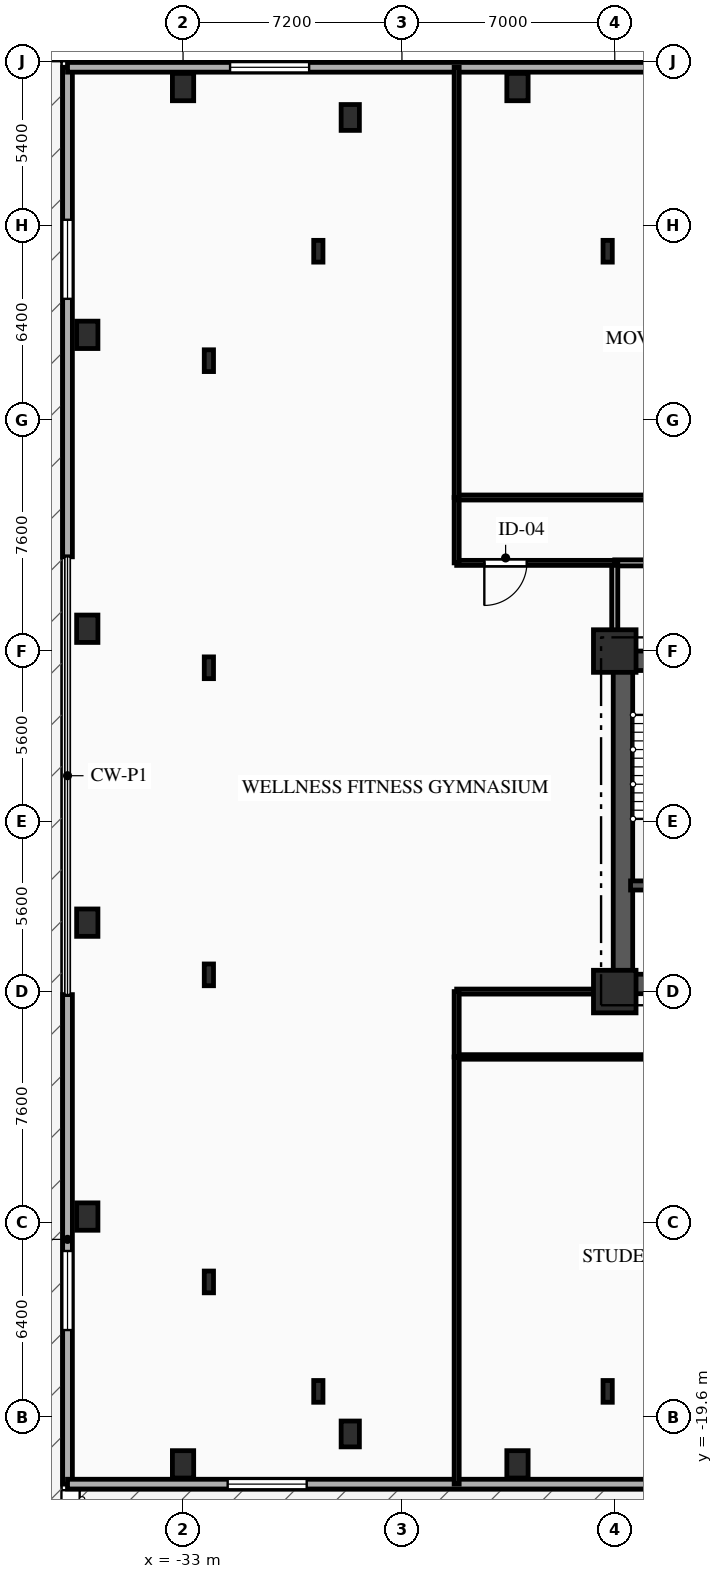
"""IFC4 building model, lengths in metres.
Left out: names, types, materials, properties, quantities, classifications, styles, units other than length and angle.
Written with IfcOpenShell. Run it as: python <this file> out.ifc"""

import sys

from ifc_helpers import new_model, si_unit, direction, frame, frame_2d, origin, origin_2d, place, context, subcontext, project, spatial, rectangle, i_section, extrude, element, fill, save


model = new_model("IFC4")
c1 = context("Model", 3, precision=1e-05, world=origin(), true_north=direction((0.0, 1.0)))
c2 = subcontext(c1, "Body", "Model", "MODEL_VIEW")
j1 = project(units=[si_unit("LENGTHUNIT", "METRE"), si_unit("PLANEANGLEUNIT", "RADIAN")], contexts=[c1])
p1 = place(None, origin())
s1 = spatial("IfcSite", under=j1, at=p1, CompositionType="ELEMENT")
p2 = place(p1, origin())
s2 = spatial("IfcBuilding", under=s1, at=p2, CompositionType="ELEMENT")
p3 = place(p2, frame((0.0, 0.0, 13.5)))
s3 = spatial("IfcBuildingStorey", under=s2, at=p3, CompositionType="ELEMENT", Elevation=13.5)
for number, where, z_axis, x_axis in (
    (1, (-18.8, -5.6, 0.0), (0.0, 0.0, 1.0), (1.0, 0.0, 0.0)),
    (2, (-18.8, 5.6, 0.0), (0.0, 0.0, 1.0), (1.0, 0.0, 0.0)),
):
    element("IfcColumn", number, at=place(p3, frame(where, z_axis=z_axis, x_axis=x_axis)), inside=s3, PredefinedType="COLUMN", context=c2, shape_type="SweptSolid", body=[
        extrude(rectangle(XDim=1.4, YDim=1.4, at=origin_2d()), origin(), (0.0, 0.0, 1.0), 4.5),
    ])
for number, where, z_axis, x_axis in (
    (3, (-33.0, -21.15, 0.0), (0.0, 0.0, 1.0), (1.0, 0.0, 0.0)),
    (4, (-22.0, -21.15, 0.0), (0.0, 0.0, 1.0), (1.0, 0.0, 0.0)),
    (5, (-33.0, 24.15, 0.0), (0.0, 0.0, 1.0), (1.0, 0.0, 0.0)),
    (6, (-22.0, 24.15, 0.0), (0.0, 0.0, 1.0), (1.0, 0.0, 0.0)),
    (7, (-36.15, -13.0, 0.0), (0.0, 0.0, 1.0), (1.0, 0.0, 0.0)),
    (8, (-36.15, -3.333, 0.0), (0.0, 0.0, 1.0), (1.0, 0.0, 0.0)),
    (9, (-36.15, 6.333, 0.0), (0.0, 0.0, 1.0), (1.0, 0.0, 0.0)),
    (10, (-36.15, 16.0, 0.0), (0.0, 0.0, 1.0), (1.0, 0.0, 0.0)),
):
    element("IfcColumn", number, at=place(p3, frame(where, z_axis=z_axis, x_axis=x_axis)), inside=s3, PredefinedType="COLUMN", context=c2, shape_type="SweptSolid", body=[
        extrude(rectangle(XDim=0.7, YDim=0.9, at=origin_2d()), origin(), (0.0, 0.0, 1.0), 4.5),
    ])
for number, where, z_axis, x_axis in (
    (11, (-27.5, -20.15, 0.0), (0.0, 0.0, 1.0), (1.0, 0.0, 0.0)),
    (12, (-27.5, 23.15, 0.0), (0.0, 0.0, 1.0), (1.0, 0.0, 0.0)),
):
    element("IfcColumn", number, at=place(p3, frame(where, z_axis=z_axis, x_axis=x_axis)), inside=s3, PredefinedType="PILASTER", context=c2, shape_type="SweptSolid", body=[
        extrude(rectangle(XDim=0.6, YDim=0.85, at=origin_2d()), origin(), (0.0, 0.0, 1.0), 4.5),
    ])
for number, where, z_axis, x_axis in (
    (13, (-28.55, -18.75, 0.0), (0.0, 0.0, 1.0), (1.0, 0.0, 0.0)),
    (14, (-19.033, -18.75, 0.0), (0.0, 0.0, 1.0), (1.0, 0.0, 0.0)),
    (15, (-19.033, 18.75, 0.0), (0.0, 0.0, 1.0), (1.0, 0.0, 0.0)),
    (16, (-28.55, 18.75, 0.0), (0.0, 0.0, 1.0), (1.0, 0.0, 0.0)),
    (17, (-32.15, 15.15, 0.0), (0.0, 0.0, 1.0), (1.0, 0.0, 0.0)),
    (18, (-32.15, 5.05, 0.0), (0.0, 0.0, 1.0), (1.0, 0.0, 0.0)),
    (19, (-32.15, -5.05, 0.0), (0.0, 0.0, 1.0), (1.0, 0.0, 0.0)),
    (20, (-32.15, -15.15, 0.0), (0.0, 0.0, 1.0), (1.0, 0.0, 0.0)),
):
    element("IfcColumn", number, at=place(p3, frame(where, z_axis=z_axis, x_axis=x_axis)), inside=s3, PredefinedType="COLUMN", context=c2, shape_type="SweptSolid", body=[
        extrude(i_section(OverallWidth=0.304, OverallDepth=0.716, WebThickness=0.021, FlangeThickness=0.04, FilletRadius=0.027, at=origin_2d()), origin(), (0.0, 0.0, 1.0), 4.5),
    ])
p4 = place(p3, frame((-36.8, -21.8, 0.0), z_axis=(0.0, 0.0, 1.0), x_axis=(0.0, 1.0, 0.0)))
e21 = element("IfcWall", 21, at=p4, inside=s3, PredefinedType="SOLIDWALL", context=c2, shape_type="SweptSolid", body=[
    extrude(rectangle(XDim=16.1, YDim=0.32, at=frame_2d((8.05, 0.0))), origin(), (0.0, 0.0, 1.0), 4.17),
])
p5 = place(p4, frame((5.067, 0.0, 0.85)))
e22 = element("IfcOpeningElement", 22, at=p5, cuts=e21, PredefinedType="OPENING", context=c2, shape_type="SweptSolid", body=[
    extrude(rectangle(XDim=2.6, YDim=2.4, at=frame_2d((1.3, 1.2))), frame((0.0, 0.17, 0.0), z_axis=(0.0, -1.0, 0.0), x_axis=(1.0, 0.0, 0.0)), (0.0, 0.0, 1.0), 0.34),
])
p6 = place(p3, frame((-36.8, 8.7, 0.0), z_axis=(0.0, 0.0, 1.0), x_axis=(0.0, 1.0, 0.0)))
e23 = element("IfcWall", 23, at=p6, inside=s3, PredefinedType="SOLIDWALL", context=c2, shape_type="SweptSolid", body=[
    extrude(rectangle(XDim=16.1, YDim=0.32, at=frame_2d((8.05, 0.0))), origin(), (0.0, 0.0, 1.0), 4.17),
])
p7 = place(p6, frame((8.485, 0.0, 0.85)))
e24 = element("IfcOpeningElement", 24, at=p7, cuts=e23, PredefinedType="OPENING", context=c2, shape_type="SweptSolid", body=[
    extrude(rectangle(XDim=2.6, YDim=2.4, at=frame_2d((1.3, 1.2))), frame((0.0, 0.17, 0.0), z_axis=(0.0, -1.0, 0.0), x_axis=(1.0, 0.0, 0.0)), (0.0, 0.0, 1.0), 0.34),
])
p8 = place(p3, frame((-36.8, 24.8, 0.0), z_axis=(0.0, 0.0, 1.0), x_axis=(1.0, 0.0, 0.0)))
e25 = element("IfcWall", 25, at=p8, inside=s3, PredefinedType="SOLIDWALL", context=c2, shape_type="SweptSolid", body=[
    extrude(rectangle(XDim=73.6, YDim=0.32, at=frame_2d((36.8, 0.0))), origin(), (0.0, 0.0, 1.0), 4.17),
])
p9 = place(p8, frame((5.347, 0.0, 0.85)))
e26 = element("IfcOpeningElement", 26, at=p9, cuts=e25, PredefinedType="OPENING", context=c2, shape_type="SweptSolid", body=[
    extrude(rectangle(XDim=2.6, YDim=2.4, at=frame_2d((1.3, 1.2))), frame((0.0, 0.17, 0.0), z_axis=(0.0, -1.0, 0.0), x_axis=(1.0, 0.0, 0.0)), (0.0, 0.0, 1.0), 0.34),
])
p10 = place(p8, frame((20.448, 0.0, 0.85)))
e27 = element("IfcOpeningElement", 27, at=p10, cuts=e25, PredefinedType="OPENING", context=c2, shape_type="SweptSolid", body=[
    extrude(rectangle(XDim=2.6, YDim=2.4, at=frame_2d((1.3, 1.2))), frame((0.0, 0.17, 0.0), z_axis=(0.0, -1.0, 0.0), x_axis=(1.0, 0.0, 0.0)), (0.0, 0.0, 1.0), 0.34),
])
p11 = place(p8, frame((44.474, 0.0, 0.85)))
e28 = element("IfcOpeningElement", 28, at=p11, cuts=e25, PredefinedType="OPENING", context=c2, shape_type="SweptSolid", body=[
    extrude(rectangle(XDim=2.6, YDim=2.4, at=frame_2d((1.3, 1.2))), frame((0.0, 0.17, 0.0), z_axis=(0.0, -1.0, 0.0), x_axis=(1.0, 0.0, 0.0)), (0.0, 0.0, 1.0), 0.34),
])
p12 = place(p8, frame((65.733, 0.0, 0.85)))
e29 = element("IfcOpeningElement", 29, at=p12, cuts=e25, PredefinedType="OPENING", context=c2, shape_type="SweptSolid", body=[
    extrude(rectangle(XDim=2.6, YDim=2.4, at=frame_2d((1.3, 1.2))), frame((0.0, 0.17, 0.0), z_axis=(0.0, -1.0, 0.0), x_axis=(1.0, 0.0, 0.0)), (0.0, 0.0, 1.0), 0.34),
])
p13 = place(p3, frame((36.8, -21.8, 0.0), z_axis=(0.0, 0.0, 1.0), x_axis=(-1.0, 0.0, 0.0)))
e30 = element("IfcWall", 30, at=p13, inside=s3, PredefinedType="SOLIDWALL", context=c2, shape_type="SweptSolid", body=[
    extrude(rectangle(XDim=73.6, YDim=0.32, at=frame_2d((36.8, 0.0))), origin(), (0.0, 0.0, 1.0), 4.17),
])
p14 = place(p13, frame((0.75, 0.0, 0.0)))
e31 = element("IfcOpeningElement", 31, at=p14, cuts=e30, PredefinedType="OPENING", context=c2, shape_type="SweptSolid", body=[
    extrude(rectangle(XDim=1.5, YDim=2.2, at=frame_2d((0.75, 1.1))), frame((0.0, 0.17, 0.0), z_axis=(0.0, -1.0, 0.0), x_axis=(1.0, 0.0, 0.0)), (0.0, 0.0, 1.0), 0.34),
])
p15 = place(p13, frame((5.347, 0.0, 0.85)))
e32 = element("IfcOpeningElement", 32, at=p15, cuts=e30, PredefinedType="OPENING", context=c2, shape_type="SweptSolid", body=[
    extrude(rectangle(XDim=2.6, YDim=2.4, at=frame_2d((1.3, 1.2))), frame((0.0, 0.17, 0.0), z_axis=(0.0, -1.0, 0.0), x_axis=(1.0, 0.0, 0.0)), (0.0, 0.0, 1.0), 0.34),
])
p16 = place(p13, frame((29.293, 0.0, 0.85)))
e33 = element("IfcOpeningElement", 33, at=p16, cuts=e30, PredefinedType="OPENING", context=c2, shape_type="SweptSolid", body=[
    extrude(rectangle(XDim=2.6, YDim=2.4, at=frame_2d((1.3, 1.2))), frame((0.0, 0.17, 0.0), z_axis=(0.0, -1.0, 0.0), x_axis=(1.0, 0.0, 0.0)), (0.0, 0.0, 1.0), 0.34),
])
p17 = place(p13, frame((49.195, 0.0, 0.85)))
e34 = element("IfcOpeningElement", 34, at=p17, cuts=e30, PredefinedType="OPENING", context=c2, shape_type="SweptSolid", body=[
    extrude(rectangle(XDim=2.6, YDim=2.4, at=frame_2d((1.3, 1.2))), frame((0.0, 0.17, 0.0), z_axis=(0.0, -1.0, 0.0), x_axis=(1.0, 0.0, 0.0)), (0.0, 0.0, 1.0), 0.34),
])
p18 = place(p13, frame((65.733, 0.0, 0.85)))
e35 = element("IfcOpeningElement", 35, at=p18, cuts=e30, PredefinedType="OPENING", context=c2, shape_type="SweptSolid", body=[
    extrude(rectangle(XDim=2.6, YDim=2.4, at=frame_2d((1.3, 1.2))), frame((0.0, 0.17, 0.0), z_axis=(0.0, -1.0, 0.0), x_axis=(1.0, 0.0, 0.0)), (0.0, 0.0, 1.0), 0.34),
])
p19 = place(p3, frame((-18.8, 5.28, 0.0), z_axis=(0.0, 0.0, 1.0), x_axis=(1.0, 0.0, 0.0)))
e36 = element("IfcWall", 36, at=p19, inside=s3, PredefinedType="SHEAR", context=c2, shape_type="SweptSolid", body=[
    extrude(rectangle(XDim=9.6, YDim=0.64, at=frame_2d((4.8, 0.0))), origin(), (0.0, 0.0, 1.0), 4.17),
])
p20 = place(p19, frame((1.55, 0.0, 0.0)))
e37 = element("IfcOpeningElement", 37, at=p20, cuts=e36, PredefinedType="OPENING", context=c2, shape_type="SweptSolid", body=[
    extrude(rectangle(XDim=1.1, YDim=2.15, at=frame_2d((0.55, 1.075))), frame((0.0, 0.33, 0.0), z_axis=(0.0, -1.0, 0.0), x_axis=(1.0, 0.0, 0.0)), (0.0, 0.0, 1.0), 0.66),
])
p21 = place(p19, frame((4.775, 0.0, 0.0)))
e38 = element("IfcOpeningElement", 38, at=p21, cuts=e36, PredefinedType="OPENING", context=c2, shape_type="SweptSolid", body=[
    extrude(rectangle(XDim=1.05, YDim=2.1, at=frame_2d((0.525, 1.05))), frame((0.0, 0.33, 0.0), z_axis=(0.0, -1.0, 0.0), x_axis=(1.0, 0.0, 0.0)), (0.0, 0.0, 1.0), 0.66),
])
p22 = place(p3, frame((-18.8, -5.35, 0.0), z_axis=(0.0, 0.0, 1.0), x_axis=(1.0, 0.0, 0.0)))
e39 = element("IfcWall", 39, at=p22, inside=s3, PredefinedType="SHEAR", context=c2, shape_type="SweptSolid", body=[
    extrude(rectangle(XDim=9.6, YDim=0.64, at=frame_2d((4.8, 0.0))), origin(), (0.0, 0.0, 1.0), 4.17),
])
p23 = place(p22, frame((1.05, 0.0, 0.0)))
e40 = element("IfcOpeningElement", 40, at=p23, cuts=e39, PredefinedType="OPENING", context=c2, shape_type="SweptSolid", body=[
    extrude(rectangle(XDim=0.9, YDim=2.1, at=frame_2d((0.45, 1.05))), frame((0.0, 0.33, 0.0), z_axis=(0.0, -1.0, 0.0), x_axis=(1.0, 0.0, 0.0)), (0.0, 0.0, 1.0), 0.66),
])
p24 = place(p3, frame((-18.53, -5.05, 0.0), z_axis=(0.0, 0.0, 1.0), x_axis=(0.0, 1.0, 0.0)))
e41 = element("IfcWall", 41, at=p24, inside=s3, PredefinedType="SHEAR", context=c2, shape_type="SweptSolid", body=[
    extrude(rectangle(XDim=10.1, YDim=0.64, at=frame_2d((5.05, 0.0))), origin(), (0.0, 0.0, 1.0), 4.17),
])
p25 = place(p3, frame((-18.28, -2.11, 0.0), z_axis=(0.0, 0.0, 1.0), x_axis=(1.0, 0.0, 0.0)))
e42 = element("IfcWall", 42, at=p25, inside=s3, PredefinedType="SHEAR", context=c2, shape_type="SweptSolid", body=[
    extrude(rectangle(XDim=3.18, YDim=0.3, at=frame_2d((1.59, 0.0))), origin(), (0.0, 0.0, 1.0), 4.17),
])
p26 = place(p3, frame((-12.0, 8.5, 0.0), z_axis=(0.0, 0.0, 1.0), x_axis=(-1.0, 0.0, 0.0)))
e43 = element("IfcWall", 43, at=p26, inside=s3, PredefinedType="PARTITIONING", context=c2, shape_type="SweptSolid", body=[
    extrude(rectangle(XDim=6.8, YDim=0.2, at=frame_2d((3.4, 0.0))), origin(), (0.0, 0.0, 1.0), 4.17),
])
p27 = place(p26, frame((1.715, 0.0, 0.0)))
e44 = element("IfcOpeningElement", 44, at=p27, cuts=e43, PredefinedType="OPENING", context=c2, shape_type="SweptSolid", body=[
    extrude(rectangle(XDim=1.1, YDim=2.15, at=frame_2d((0.55, 1.075))), frame((0.0, 0.11, 0.0), z_axis=(0.0, -1.0, 0.0), x_axis=(1.0, 0.0, 0.0)), (0.0, 0.0, 1.0), 0.22),
])
p28 = place(p3, frame((-18.8, 8.5, 0.0), z_axis=(0.0, 0.0, 1.0), x_axis=(0.0, -1.0, 0.0)))
e45 = element("IfcWall", 45, at=p28, inside=s3, PredefinedType="PARTITIONING", context=c2, shape_type="SweptSolid", body=[
    extrude(rectangle(XDim=2.9, YDim=0.2, at=frame_2d((1.45, 0.0))), origin(), (0.0, 0.0, 1.0), 3.655),
])
p29 = place(p3, frame((-18.8, 8.5, 0.0), z_axis=(0.0, 0.0, 1.0), x_axis=(-1.0, 0.0, 0.0)))
e46 = element("IfcWall", 46, at=p29, inside=s3, PredefinedType="PARTITIONING", context=c2, shape_type="SweptSolid", body=[
    extrude(rectangle(XDim=5.2, YDim=0.165, at=frame_2d((2.6, 0.0))), origin(), (0.0, 0.0, 1.0), 4.17),
])
p30 = place(p29, frame((2.89, 0.0, 0.0)))
e47 = element("IfcOpeningElement", 47, at=p30, cuts=e46, PredefinedType="OPENING", context=c2, shape_type="SweptSolid", body=[
    extrude(rectangle(XDim=1.4, YDim=2.3, at=frame_2d((0.7, 1.15))), frame((0.0, 0.093, 0.0), z_axis=(0.0, -1.0, 0.0), x_axis=(1.0, 0.0, 0.0)), (0.0, 0.0, 1.0), 0.185),
])
p31 = place(p3, frame((-24.0, 8.5, 0.0), z_axis=(0.0, 0.0, 1.0), x_axis=(0.0, 1.0, 0.0)))
e48 = element("IfcWall", 48, at=p31, inside=s3, PredefinedType="PARTITIONING", context=c2, shape_type="SweptSolid", body=[
    extrude(rectangle(XDim=2.15, YDim=0.165, at=frame_2d((1.075, 0.0))), origin(), (0.0, 0.0, 1.0), 4.17),
])
p32 = place(p3, frame((-24.0, 10.65, 0.0), z_axis=(0.0, 0.0, 1.0), x_axis=(1.0, 0.0, 0.0)))
e49 = element("IfcWall", 49, at=p32, inside=s3, PredefinedType="PARTITIONING", context=c2, shape_type="SweptSolid", body=[
    extrude(rectangle(XDim=24.0, YDim=0.165, at=frame_2d((12.0, 0.0))), origin(), (0.0, 0.0, 1.0), 4.17),
])
p33 = place(p32, frame((19.34, 0.0, 0.0)))
e50 = element("IfcOpeningElement", 50, at=p33, cuts=e49, PredefinedType="OPENING", context=c2, shape_type="SweptSolid", body=[
    extrude(rectangle(XDim=1.4, YDim=2.3, at=frame_2d((0.7, 1.15))), frame((0.0, 0.093, 0.0), z_axis=(0.0, -1.0, 0.0), x_axis=(1.0, 0.0, 0.0)), (0.0, 0.0, 1.0), 0.185),
])
p34 = place(p3, frame((-3.32, -7.75, 0.0), z_axis=(0.0, 0.0, 1.0), x_axis=(-1.0, 0.0, 0.0)))
e51 = element("IfcWall", 51, at=p34, inside=s3, PredefinedType="PARTITIONING", context=c2, shape_type="SweptSolid", body=[
    extrude(rectangle(XDim=20.68, YDim=0.15, at=frame_2d((10.34, 0.0))), origin(), (0.0, 0.0, 1.0), 4.17),
])
p35 = place(p34, frame((9.815, 0.0, 0.0)))
e52 = element("IfcOpeningElement", 52, at=p35, cuts=e51, PredefinedType="OPENING", context=c2, shape_type="SweptSolid", body=[
    extrude(rectangle(XDim=1.05, YDim=2.15, at=frame_2d((0.525, 1.075))), frame((0.0, 0.085, 0.0), z_axis=(0.0, -1.0, 0.0), x_axis=(1.0, 0.0, 0.0)), (0.0, 0.0, 1.0), 0.17),
])
p36 = place(p3, frame((-24.0, -5.6, 0.0), z_axis=(0.0, 0.0, 1.0), x_axis=(1.0, 0.0, 0.0)))
e53 = element("IfcWall", 53, at=p36, inside=s3, PredefinedType="PARTITIONING", context=c2, shape_type="SweptSolid", body=[
    extrude(rectangle(XDim=5.2, YDim=0.165, at=frame_2d((2.6, 0.0))), origin(), (0.0, 0.0, 1.0), 4.17),
])
p37 = place(p3, frame((-24.0, -7.75, 0.0), z_axis=(0.0, 0.0, 1.0), x_axis=(0.0, 1.0, 0.0)))
e54 = element("IfcWall", 54, at=p37, inside=s3, PredefinedType="PARTITIONING", context=c2, shape_type="SweptSolid", body=[
    extrude(rectangle(XDim=2.15, YDim=0.165, at=frame_2d((1.075, 0.0))), origin(), (0.0, 0.0, 1.0), 4.17),
])
p38 = place(p3, frame((-24.0, -21.8, 0.0), z_axis=(0.0, 0.0, 1.0), x_axis=(0.0, 1.0, 0.0)))
e55 = element("IfcWall", 55, at=p38, inside=s3, PredefinedType="PARTITIONING", context=c2, shape_type="SweptSolid", body=[
    extrude(rectangle(XDim=14.05, YDim=0.165, at=frame_2d((7.025, 0.0))), origin(), (0.0, 0.0, 1.0), 4.17),
])
p39 = place(p3, frame((-24.0, 24.8, 0.0), z_axis=(0.0, 0.0, 1.0), x_axis=(0.0, -1.0, 0.0)))
e56 = element("IfcWall", 56, at=p39, inside=s3, PredefinedType="PARTITIONING", context=c2, shape_type="SweptSolid", body=[
    extrude(rectangle(XDim=14.15, YDim=0.165, at=frame_2d((7.075, 0.0))), origin(), (0.0, 0.0, 1.0), 4.17),
])
p40 = place(p5, origin())
e57 = element("IfcWindow", 57, at=p40, inside=s3, PartitioningType="SINGLE_PANEL", PredefinedType="WINDOW", context=c2, shape_type="SweptSolid", body=[
    extrude(rectangle(XDim=2.6, YDim=2.4, at=frame_2d((1.3, 1.2))), frame((0.0, 0.03, 0.0), z_axis=(0.0, -1.0, 0.0), x_axis=(1.0, 0.0, 0.0)), (0.0, 0.0, 1.0), 0.06),
])
fill(e22, e57)
p41 = place(p7, origin())
e58 = element("IfcWindow", 58, at=p41, inside=s3, PartitioningType="SINGLE_PANEL", PredefinedType="WINDOW", context=c2, shape_type="SweptSolid", body=[
    extrude(rectangle(XDim=2.6, YDim=2.4, at=frame_2d((1.3, 1.2))), frame((0.0, 0.03, 0.0), z_axis=(0.0, -1.0, 0.0), x_axis=(1.0, 0.0, 0.0)), (0.0, 0.0, 1.0), 0.06),
])
fill(e24, e58)
p42 = place(p9, origin())
e59 = element("IfcWindow", 59, at=p42, inside=s3, PartitioningType="SINGLE_PANEL", PredefinedType="WINDOW", context=c2, shape_type="SweptSolid", body=[
    extrude(rectangle(XDim=2.6, YDim=2.4, at=frame_2d((1.3, 1.2))), frame((0.0, 0.03, 0.0), z_axis=(0.0, -1.0, 0.0), x_axis=(1.0, 0.0, 0.0)), (0.0, 0.0, 1.0), 0.06),
])
fill(e26, e59)
p43 = place(p18, origin())
e60 = element("IfcWindow", 60, at=p43, inside=s3, PartitioningType="SINGLE_PANEL", PredefinedType="WINDOW", context=c2, shape_type="SweptSolid", body=[
    extrude(rectangle(XDim=2.6, YDim=2.4, at=frame_2d((1.3, 1.2))), frame((0.0, 0.03, 0.0), z_axis=(0.0, -1.0, 0.0), x_axis=(1.0, 0.0, 0.0)), (0.0, 0.0, 1.0), 0.06),
])
fill(e35, e60)
p44 = place(p30, origin())
e61 = element("IfcDoor", 61, at=p44, inside=s3, OperationType="SINGLE_SWING_RIGHT", PredefinedType="DOOR", context=c2, shape_type="SweptSolid", body=[
    extrude(rectangle(XDim=1.4, YDim=2.3, at=frame_2d((0.7, 1.15))), frame((0.0, 0.025, 0.0), z_axis=(0.0, -1.0, 0.0), x_axis=(1.0, 0.0, 0.0)), (0.0, 0.0, 1.0), 0.05),
])
fill(e47, e61)
save(model, sys.argv[1])
